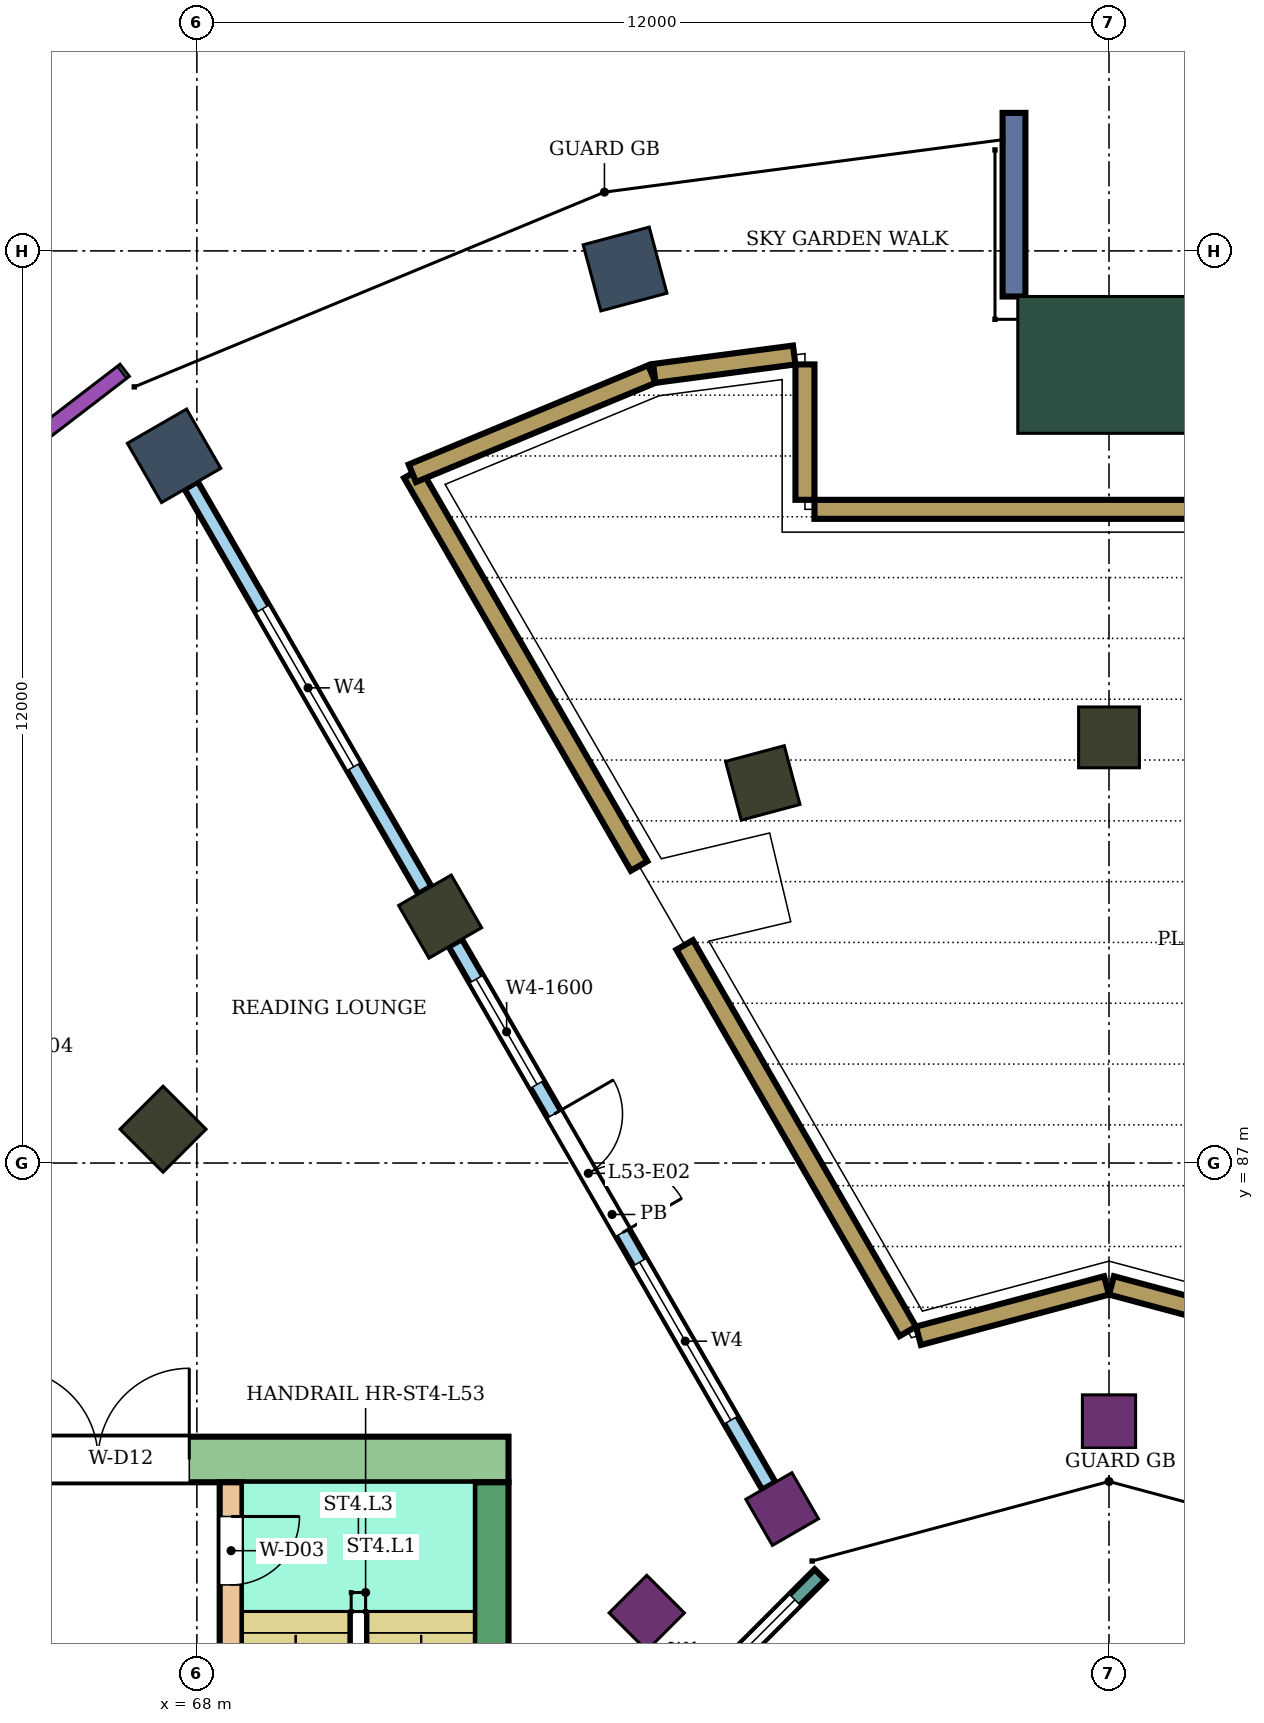
"""IFC4 building model, lengths in metres.
Left out: names, types, materials, properties, quantities, classifications, styles, units other than length and angle.
Written with IfcOpenShell. Run it as: python <this file> out.ifc"""

import sys

from ifc_helpers import new_model, si_unit, direction, frame, frame_2d, origin, origin_2d, place, context, subcontext, project, spatial, rectangle, extrude, element, fill, save


model = new_model("IFC4")
c1 = context("Model", 3, precision=1e-05, world=origin(), true_north=direction((0.0, 1.0)))
c2 = subcontext(c1, "Body", "Model", "MODEL_VIEW")
j1 = project(units=[si_unit("LENGTHUNIT", "METRE"), si_unit("PLANEANGLEUNIT", "RADIAN")], contexts=[c1])
p1 = place(None, origin())
s1 = spatial("IfcSite", under=j1, at=p1, CompositionType="ELEMENT")
p2 = place(p1, origin())
s2 = spatial("IfcBuilding", under=s1, at=p2, CompositionType="ELEMENT")
p3 = place(p2, frame((0.0, 0.0, 229.3)))
s3 = spatial("IfcBuildingStorey", under=s2, at=p3, CompositionType="ELEMENT", Elevation=229.3)
for number, where, z_axis, x_axis in (
    (1, (73.633, 98.762, 0.0), (0.0, 0.0, 1.0), (-0.259, 0.966, 0.0)),
    (2, (67.7, 96.304, 0.0), (0.0, 0.0, 1.0), (-0.5, 0.866, 0.0)),
):
    element("IfcColumn", number, at=place(p3, frame(where, z_axis=z_axis, x_axis=x_axis)), inside=s3, PredefinedType="COLUMN", context=c2, shape_type="SweptSolid", body=[
        extrude(rectangle(XDim=0.9, YDim=0.9, at=origin_2d()), origin(), (0.0, 0.0, 1.0), 8.0),
    ])
for number, where, z_axis, x_axis in (
    (3, (80.0, 92.6, 0.0), (0.0, 0.0, 1.0), (0.0, 1.0, 0.0)),
    (4, (75.445, 92.0, 0.0), (0.0, 0.0, 1.0), (-0.259, 0.966, 0.0)),
    (5, (71.2, 90.242, 0.0), (0.0, 0.0, 1.0), (-0.5, 0.866, 0.0)),
    (6, (67.555, 87.445, 0.0), (0.0, 0.0, 1.0), (-0.707, 0.707, 0.0)),
):
    element("IfcColumn", number, at=place(p3, frame(where, z_axis=z_axis, x_axis=x_axis)), inside=s3, PredefinedType="COLUMN", context=c2, shape_type="SweptSolid", body=[
        extrude(rectangle(XDim=0.8, YDim=0.8, at=origin_2d()), origin(), (0.0, 0.0, 1.0), 8.0),
    ])
for number, where, z_axis, x_axis in (
    (7, (80.0, 83.6, 0.0), (0.0, 0.0, 1.0), (0.0, 1.0, 0.0)),
    (8, (75.7, 82.448, 0.0), (0.0, 0.0, 1.0), (-0.5, 0.866, 0.0)),
    (9, (73.919, 81.081, 0.0), (0.0, 0.0, 1.0), (-0.707, 0.707, 0.0)),
):
    element("IfcColumn", number, at=place(p3, frame(where, z_axis=z_axis, x_axis=x_axis)), inside=s3, PredefinedType="COLUMN", context=c2, shape_type="SweptSolid", body=[
        extrude(rectangle(XDim=0.7, YDim=0.7, at=origin_2d()), origin(), (0.0, 0.0, 1.0), 8.0),
    ])
p4 = place(p3, frame((80.0, 97.5, 0.0), z_axis=(0.0, 0.0, 1.0), x_axis=(0.0, 1.0, 0.0)))
e10 = element("IfcColumn", 10, at=p4, inside=s3, PredefinedType="COLUMN", context=c2, shape_type="SweptSolid", body=[
    extrude(rectangle(XDim=1.8, YDim=2.4, at=origin_2d()), origin(), (0.0, 0.0, 1.0), 8.0),
])
p5 = place(p3, frame((72.1, 83.1, 0.0), z_axis=(0.0, 0.0, 1.0), x_axis=(-1.0, 0.0, 0.0)))
e11 = element("IfcWall", 11, at=p5, inside=s3, PredefinedType="SHEAR", context=c2, shape_type="SweptSolid", body=[
    extrude(rectangle(XDim=14.9, YDim=0.6, at=frame_2d((7.45, 0.0))), origin(), (0.0, 0.0, 1.0), 7.68),
])
p6 = place(p5, frame((4.2, 0.0, 0.0)))
e12 = element("IfcOpeningElement", 12, at=p6, cuts=e11, PredefinedType="OPENING", context=c2, shape_type="SweptSolid", body=[
    extrude(rectangle(XDim=2.4, YDim=2.4, at=frame_2d((1.2, 1.2))), frame((0.0, 0.31, 0.0), z_axis=(0.0, -1.0, 0.0), x_axis=(1.0, 0.0, 0.0)), (0.0, 0.0, 1.0), 0.62),
])
p7 = place(p3, frame((71.875, 82.8, 0.0), z_axis=(0.0, 0.0, 1.0), x_axis=(0.0, -1.0, 0.0)))
e13 = element("IfcWall", 13, at=p7, inside=s3, PredefinedType="SHEAR", context=c2, shape_type="SweptSolid", body=[
    extrude(rectangle(XDim=7.8, YDim=0.45, at=frame_2d((3.9, 0.0))), origin(), (0.0, 0.0, 1.0), 7.68),
])
p8 = place(p3, frame((68.45, 82.8, 0.0), z_axis=(0.0, 0.0, 1.0), x_axis=(0.0, -1.0, 0.0)))
e14 = element("IfcWall", 14, at=p8, inside=s3, PredefinedType="SHEAR", context=c2, shape_type="SweptSolid", body=[
    extrude(rectangle(XDim=7.8, YDim=0.3, at=frame_2d((3.9, 0.0))), origin(), (0.0, 0.0, 1.0), 7.68),
])
p9 = place(p8, frame((0.45, 0.0, 0.0)))
e15 = element("IfcOpeningElement", 15, at=p9, cuts=e14, PredefinedType="OPENING", context=c2, shape_type="SweptSolid", body=[
    extrude(rectangle(XDim=0.9, YDim=2.1, at=frame_2d((0.45, 1.05))), frame((0.0, 0.16, 0.0), z_axis=(0.0, -1.0, 0.0), x_axis=(1.0, 0.0, 0.0)), (0.0, 0.0, 1.0), 0.32),
])
p10 = place(p3, frame((78.75, 98.4, 0.0), z_axis=(0.0, 0.0, 1.0), x_axis=(0.0, 1.0, 0.0)))
e16 = element("IfcWall", 16, at=p10, inside=s3, PredefinedType="NOTDEFINED", context=c2, shape_type="SweptSolid", body=[
    extrude(rectangle(XDim=2.416, YDim=0.3, at=frame_2d((1.208, 0.0))), origin(), (0.0, 0.0, 1.0), 8.0),
])
p11 = place(p3, frame((76.198, 81.585, 0.0), z_axis=(0.0, 0.0, 1.0), x_axis=(-0.707106781187, -0.707106781187, 0.0)))
e17 = element("IfcWall", 17, at=p11, inside=s3, PredefinedType="NOTDEFINED", context=c2, shape_type="SweptSolid", body=[
    extrude(rectangle(XDim=3.936, YDim=0.2, at=frame_2d((1.968, 0.0))), origin(), (0.0, 0.0, 1.0), 8.0),
])
p12 = place(p11, frame((0.468, 0.0, 0.9)))
e18 = element("IfcOpeningElement", 18, at=p12, cuts=e17, PredefinedType="OPENING", context=c2, shape_type="SweptSolid", body=[
    extrude(rectangle(XDim=3.0, YDim=2.3, at=frame_2d((1.5, 1.15))), frame((0.0, 0.11, 0.0), z_axis=(0.0, -1.0, 0.0), x_axis=(1.0, 0.0, 0.0)), (0.0, 0.0, 1.0), 0.22),
])
p13 = place(p3, frame((70.835, 96.074, 0.0), z_axis=(0.0, 0.0, 1.0), x_axis=(0.500003486784, -0.866023390679, 0.0)))
e19 = element("IfcWall", 19, at=p13, inside=s3, PredefinedType="USERDEFINED", context=c2, shape_type="SweptSolid", body=[
    extrude(rectangle(XDim=5.966, YDim=0.25, at=frame_2d((2.983, 0.0))), origin(), (0.0, 0.0, 1.0), 0.6),
])
p14 = place(p3, frame((74.418, 89.869, 0.0), z_axis=(0.0, 0.0, 1.0), x_axis=(0.499999689456, -0.866025583077, 0.0)))
e20 = element("IfcWall", 20, at=p14, inside=s3, PredefinedType="USERDEFINED", context=c2, shape_type="SweptSolid", body=[
    extrude(rectangle(XDim=5.87, YDim=0.25, at=frame_2d((2.935, 0.0))), origin(), (0.0, 0.0, 1.0), 0.6),
])
for number, where, z_axis, x_axis in (
    (21, (77.493, 84.727, 0.0), (0.0, 0.0, 1.0), (0.966, 0.259, 0.0)),
    (22, (80.032, 85.39, 0.0), (0.0, 0.0, 1.0), (0.966, -0.259, 0.0)),
):
    element("IfcWall", number, at=place(p3, frame(where, z_axis=z_axis, x_axis=x_axis)), inside=s3, PredefinedType="USERDEFINED", context=c2, shape_type="SweptSolid", body=[
        extrude(rectangle(XDim=2.562, YDim=0.25, at=frame_2d((1.281, 0.0))), origin(), (0.0, 0.0, 1.0), 0.6),
    ])
p15 = place(p3, frame((83.875, 95.6, 0.0), z_axis=(0.0, 0.0, 1.0), x_axis=(-1.0, 0.0, 0.0)))
e23 = element("IfcWall", 23, at=p15, inside=s3, PredefinedType="USERDEFINED", context=c2, shape_type="SweptSolid", body=[
    extrude(rectangle(XDim=7.75, YDim=0.25, at=frame_2d((3.875, 0.0))), origin(), (0.0, 0.0, 1.0), 0.6),
])
p16 = place(p3, frame((76.0, 95.725, 0.0), z_axis=(0.0, 0.0, 1.0), x_axis=(0.0, 1.0, 0.0)))
e24 = element("IfcWall", 24, at=p16, inside=s3, PredefinedType="USERDEFINED", context=c2, shape_type="SweptSolid", body=[
    extrude(rectangle(XDim=1.781, YDim=0.25, at=frame_2d((0.891, 0.0))), origin(), (0.0, 0.0, 1.0), 0.6),
])
p17 = place(p3, frame((75.859, 97.631, 0.0), z_axis=(0.0, 0.0, 1.0), x_axis=(-0.991436829887, -0.130587182926, 0.0)))
e25 = element("IfcWall", 25, at=p17, inside=s3, PredefinedType="USERDEFINED", context=c2, shape_type="SweptSolid", body=[
    extrude(rectangle(XDim=1.856, YDim=0.25, at=frame_2d((0.928, 0.0))), origin(), (0.0, 0.0, 1.0), 0.6),
])
p18 = place(p3, frame((73.986, 97.38, 0.0), z_axis=(0.0, 0.0, 1.0), x_axis=(-0.923871147788, -0.38270367425, 0.0)))
e26 = element("IfcWall", 26, at=p18, inside=s3, PredefinedType="USERDEFINED", context=c2, shape_type="SweptSolid", body=[
    extrude(rectangle(XDim=3.411, YDim=0.25, at=frame_2d((1.706, 0.0))), origin(), (0.0, 0.0, 1.0), 0.6),
])
p19 = place(p3, frame((75.525, 82.751, 0.0), z_axis=(0.0, 0.0, 1.0), x_axis=(-0.499996545922, 0.866027397988, 0.0)))
e27 = element("IfcWall", 27, at=p19, inside=s3, PredefinedType="NOTDEFINED", context=c2, shape_type="SweptSolid", body=[
    extrude(rectangle(XDim=8.25, YDim=0.2, at=frame_2d((4.125, 0.0))), origin(), (0.0, 0.0, 1.0), 8.0),
])
p20 = place(p19, frame((1.0, 0.0, 0.3)))
e28 = element("IfcOpeningElement", 28, at=p20, cuts=e27, PredefinedType="OPENING", context=c2, shape_type="SweptSolid", body=[
    extrude(rectangle(XDim=2.4, YDim=3.6, at=frame_2d((1.2, 1.8))), frame((0.0, 0.11, 0.0), z_axis=(0.0, -1.0, 0.0), x_axis=(1.0, 0.0, 0.0)), (0.0, 0.0, 1.0), 0.22),
])
p21 = place(p19, frame((3.85, 0.0, 0.0)))
e29 = element("IfcOpeningElement", 29, at=p21, cuts=e27, PredefinedType="OPENING", context=c2, shape_type="SweptSolid", body=[
    extrude(rectangle(XDim=1.8, YDim=2.4, at=frame_2d((0.9, 1.2))), frame((0.0, 0.11, 0.0), z_axis=(0.0, -1.0, 0.0), x_axis=(1.0, 0.0, 0.0)), (0.0, 0.0, 1.0), 0.22),
])
p22 = place(p19, frame((6.1, 0.0, 0.3)))
e30 = element("IfcOpeningElement", 30, at=p22, cuts=e27, PredefinedType="OPENING", context=c2, shape_type="SweptSolid", body=[
    extrude(rectangle(XDim=1.6, YDim=3.6, at=frame_2d((0.8, 1.8))), frame((0.0, 0.11, 0.0), z_axis=(0.0, -1.0, 0.0), x_axis=(1.0, 0.0, 0.0)), (0.0, 0.0, 1.0), 0.22),
])
p23 = place(p3, frame((71.0, 90.588, 0.0), z_axis=(0.0, 0.0, 1.0), x_axis=(-0.499985903289, 0.866033542371, 0.0)))
e31 = element("IfcWall", 31, at=p23, inside=s3, PredefinedType="NOTDEFINED", context=c2, shape_type="SweptSolid", body=[
    extrude(rectangle(XDim=6.15, YDim=0.2, at=frame_2d((3.075, 0.0))), origin(), (0.0, 0.0, 1.0), 8.0),
])
p24 = place(p23, frame((1.875, 0.0, 0.3)))
e32 = element("IfcOpeningElement", 32, at=p24, cuts=e31, PredefinedType="OPENING", context=c2, shape_type="SweptSolid", body=[
    extrude(rectangle(XDim=2.4, YDim=3.6, at=frame_2d((1.2, 1.8))), frame((0.0, 0.11, 0.0), z_axis=(0.0, -1.0, 0.0), x_axis=(1.0, 0.0, 0.0)), (0.0, 0.0, 1.0), 0.22),
])
p25 = place(p12, origin())
e33 = element("IfcWindow", 33, at=p25, inside=s3, PartitioningType="SINGLE_PANEL", PredefinedType="WINDOW", context=c2, shape_type="SweptSolid", body=[
    extrude(rectangle(XDim=3.0, YDim=2.3, at=frame_2d((1.5, 1.15))), frame((0.0, 0.03, 0.0), z_axis=(0.0, -1.0, 0.0), x_axis=(1.0, 0.0, 0.0)), (0.0, 0.0, 1.0), 0.06),
])
fill(e18, e33)
p26 = place(p20, origin())
e34 = element("IfcWindow", 34, at=p26, inside=s3, PartitioningType="SINGLE_PANEL", PredefinedType="WINDOW", context=c2, shape_type="SweptSolid", body=[
    extrude(rectangle(XDim=2.4, YDim=3.6, at=frame_2d((1.2, 1.8))), frame((0.0, 0.03, 0.0), z_axis=(0.0, -1.0, 0.0), x_axis=(1.0, 0.0, 0.0)), (0.0, 0.0, 1.0), 0.06),
])
fill(e28, e34)
p27 = place(p21, frame((1.8, 0.0, 0.0), z_axis=(0.0, 0.0, 1.0), x_axis=(-1.0, 0.0, 0.0)))
e35 = element("IfcDoor", 35, at=p27, inside=s3, OperationType="DOUBLE_DOOR_SINGLE_SWING", PredefinedType="DOOR", context=c2, shape_type="SweptSolid", body=[
    extrude(rectangle(XDim=1.8, YDim=2.4, at=frame_2d((0.9, 1.2))), frame((0.0, 0.025, 0.0), z_axis=(0.0, -1.0, 0.0), x_axis=(1.0, 0.0, 0.0)), (0.0, 0.0, 1.0), 0.05),
])
fill(e29, e35)
p28 = place(p22, origin())
e36 = element("IfcWindow", 36, at=p28, inside=s3, PartitioningType="SINGLE_PANEL", PredefinedType="WINDOW", context=c2, shape_type="SweptSolid", body=[
    extrude(rectangle(XDim=1.6, YDim=3.6, at=frame_2d((0.8, 1.8))), frame((0.0, 0.03, 0.0), z_axis=(0.0, -1.0, 0.0), x_axis=(1.0, 0.0, 0.0)), (0.0, 0.0, 1.0), 0.06),
])
fill(e30, e36)
p29 = place(p24, origin())
e37 = element("IfcWindow", 37, at=p29, inside=s3, PartitioningType="SINGLE_PANEL", PredefinedType="WINDOW", context=c2, shape_type="SweptSolid", body=[
    extrude(rectangle(XDim=2.4, YDim=3.6, at=frame_2d((1.2, 1.8))), frame((0.0, 0.03, 0.0), z_axis=(0.0, -1.0, 0.0), x_axis=(1.0, 0.0, 0.0)), (0.0, 0.0, 1.0), 0.06),
])
fill(e32, e37)
p30 = place(p9, origin())
e38 = element("IfcDoor", 38, at=p30, inside=s3, OperationType="SINGLE_SWING_LEFT", PredefinedType="DOOR", context=c2, shape_type="SweptSolid", body=[
    extrude(rectangle(XDim=0.9, YDim=2.1, at=frame_2d((0.45, 1.05))), frame((0.0, 0.025, 0.0), z_axis=(0.0, -1.0, 0.0), x_axis=(1.0, 0.0, 0.0)), (0.0, 0.0, 1.0), 0.05),
])
fill(e15, e38)
p31 = place(p6, frame((2.4, 0.0, 0.0), z_axis=(0.0, 0.0, 1.0), x_axis=(-1.0, 0.0, 0.0)))
e39 = element("IfcDoor", 39, at=p31, inside=s3, OperationType="DOUBLE_DOOR_SINGLE_SWING", PredefinedType="DOOR", context=c2, shape_type="SweptSolid", body=[
    extrude(rectangle(XDim=2.4, YDim=2.4, at=frame_2d((1.2, 1.2))), frame((0.0, 0.025, 0.0), z_axis=(0.0, -1.0, 0.0), x_axis=(1.0, 0.0, 0.0)), (0.0, 0.0, 1.0), 0.05),
])
fill(e12, e39)
save(model, sys.argv[1])
